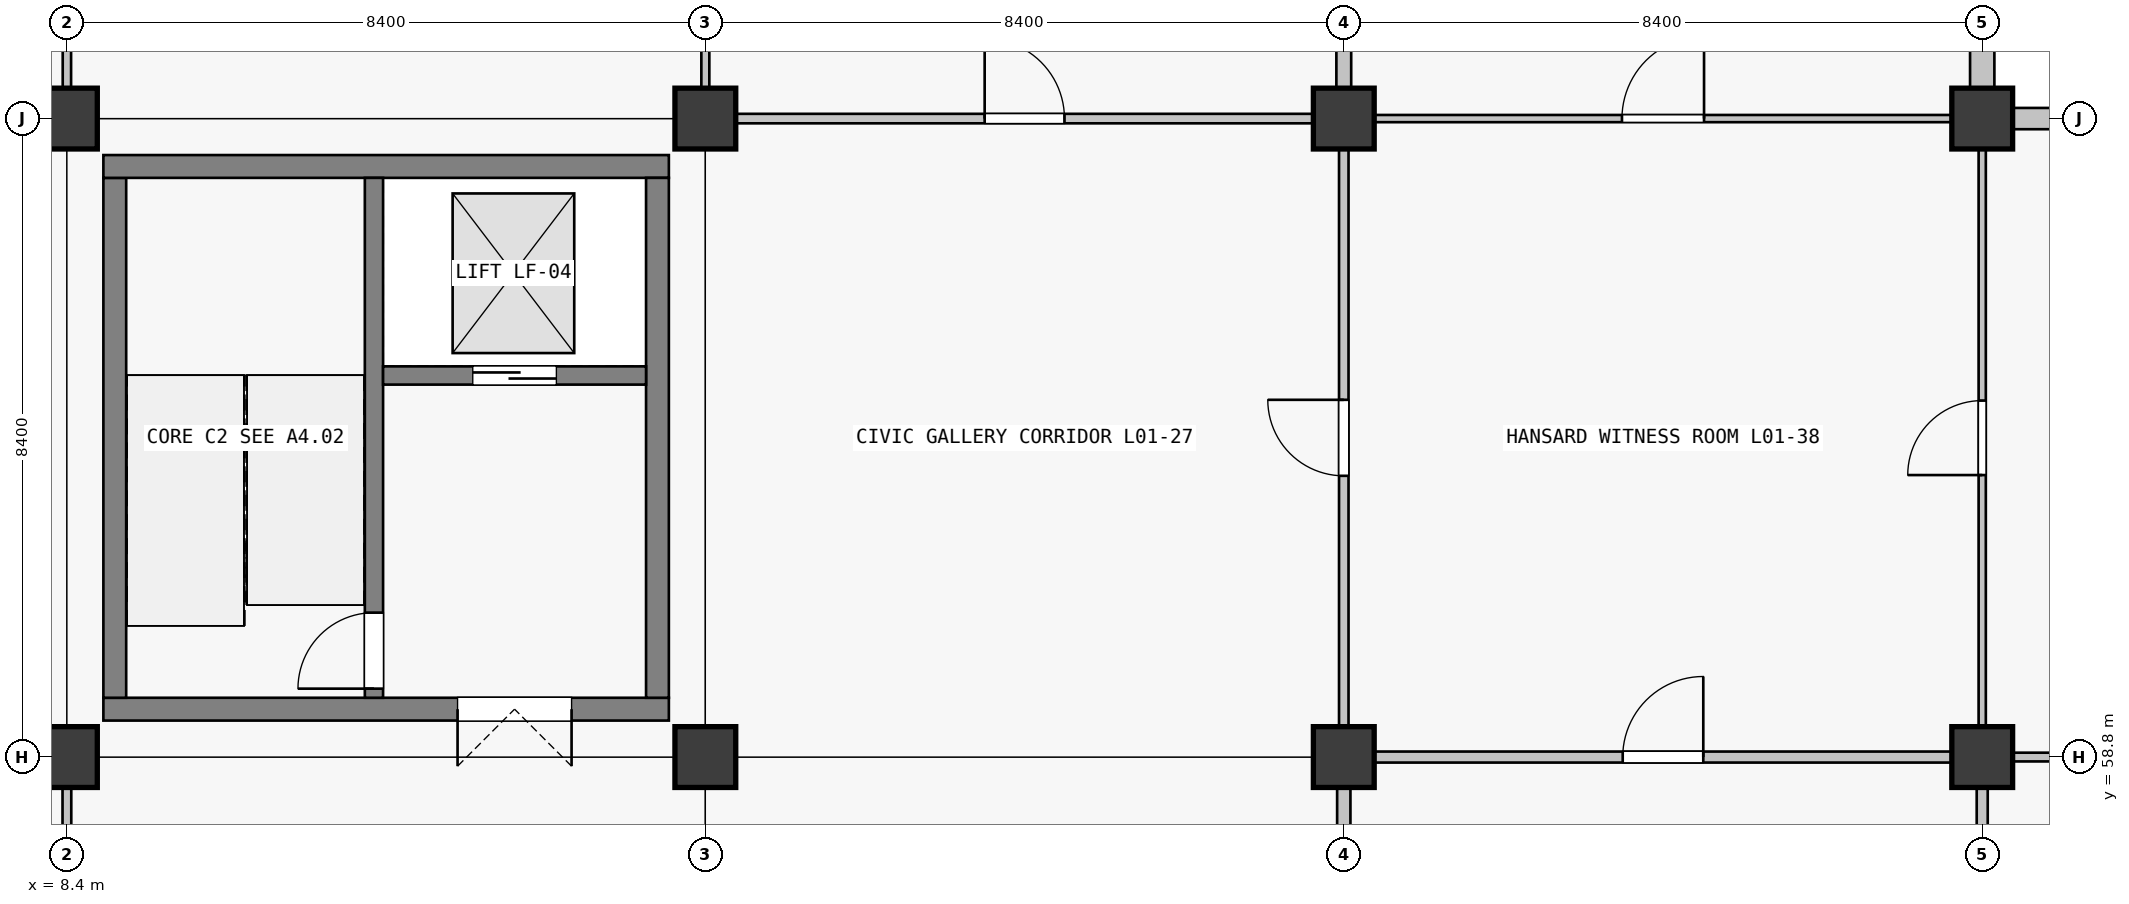
"""IFC4 building model, lengths in metres.
Left out: names, types, materials, properties, quantities, classifications, styles, units other than length and angle.
Written with IfcOpenShell. Run it as: python <this file> out.ifc"""

import sys

from ifc_helpers import new_model, si_unit, direction, frame, frame_2d, origin, origin_2d, place, context, subcontext, project, spatial, rectangle, extrude, element, fill, save


model = new_model("IFC4")
c1 = context("Model", 3, precision=1e-05, world=origin(), true_north=direction((0.0, 1.0)))
c2 = subcontext(c1, "Body", "Model", "MODEL_VIEW")
j1 = project(units=[si_unit("LENGTHUNIT", "METRE"), si_unit("PLANEANGLEUNIT", "RADIAN")], contexts=[c1])
p1 = place(None, origin())
s1 = spatial("IfcSite", under=j1, at=p1, CompositionType="ELEMENT")
p2 = place(p1, origin())
s2 = spatial("IfcBuilding", under=s1, at=p2, CompositionType="ELEMENT")
p3 = place(p2, frame((0.0, 0.0, 5.76)))
s3 = spatial("IfcBuildingStorey", under=s2, at=p3, CompositionType="ELEMENT", Elevation=5.76)
for number, where, z_axis, x_axis in (
    (1, (8.4, 58.8, 0.0), (0.0, 0.0, 1.0), (1.0, 0.0, 0.0)),
    (2, (8.4, 67.2, 0.0), (0.0, 0.0, 1.0), (1.0, 0.0, 0.0)),
    (3, (16.8, 58.8, 0.0), (0.0, 0.0, 1.0), (1.0, 0.0, 0.0)),
    (4, (16.8, 67.2, 0.0), (0.0, 0.0, 1.0), (1.0, 0.0, 0.0)),
    (5, (25.2, 58.8, 0.0), (0.0, 0.0, 1.0), (1.0, 0.0, 0.0)),
    (6, (25.2, 67.2, 0.0), (0.0, 0.0, 1.0), (1.0, 0.0, 0.0)),
    (7, (33.6, 58.8, 0.0), (0.0, 0.0, 1.0), (1.0, 0.0, 0.0)),
    (8, (33.6, 67.2, 0.0), (0.0, 0.0, 1.0), (1.0, 0.0, 0.0)),
):
    element("IfcColumn", number, at=place(p3, frame(where, z_axis=z_axis, x_axis=x_axis)), inside=s3, PredefinedType="COLUMN", context=c2, shape_type="SweptSolid", body=[
        extrude(rectangle(XDim=0.8, YDim=0.8, at=origin_2d()), origin(), (0.0, 0.0, 1.0), 4.5),
    ])
p4 = place(p3, frame((33.6, 75.199, 0.0), z_axis=(0.0, 0.0, 1.0), x_axis=(0.0, -1.0, 0.0)))
e9 = element("IfcWall", 9, at=p4, inside=s3, PredefinedType="SOLIDWALL", context=c2, shape_type="SweptSolid", body=[
    extrude(rectangle(XDim=7.598, YDim=0.32, at=frame_2d((3.799, 0.0))), origin(), (0.0, 0.0, 1.0), 3.4),
])
p5 = place(p4, frame((2.524, 0.0, 0.9)))
e10 = element("IfcOpeningElement", 10, at=p5, cuts=e9, PredefinedType="OPENING", context=c2, shape_type="SweptSolid", body=[
    extrude(rectangle(XDim=2.55, YDim=1.95, at=frame_2d((1.275, 0.975))), frame((0.0, 0.16, 0.0), z_axis=(0.0, -1.0, 0.0), x_axis=(1.0, 0.0, 0.0)), (0.0, 0.0, 1.0), 0.32),
])
p6 = place(p3, frame((34.001, 67.2, 0.0), z_axis=(0.0, 0.0, 1.0), x_axis=(1.0, 0.0, 0.0)))
e11 = element("IfcWall", 11, at=p6, inside=s3, PredefinedType="SOLIDWALL", context=c2, shape_type="SweptSolid", body=[
    extrude(rectangle(XDim=7.598, YDim=0.28, at=frame_2d((3.799, 0.0))), origin(), (0.0, 0.0, 1.0), 3.4),
])
p7 = place(p6, frame((3.149, 0.0, 0.9)))
e12 = element("IfcOpeningElement", 12, at=p7, cuts=e11, PredefinedType="OPENING", context=c2, shape_type="SweptSolid", body=[
    extrude(rectangle(XDim=1.3, YDim=1.95, at=frame_2d((0.65, 0.975))), frame((0.0, 0.14, 0.0), z_axis=(0.0, -1.0, 0.0), x_axis=(1.0, 0.0, 0.0)), (0.0, 0.0, 1.0), 0.28),
])
p8 = place(p3, frame((16.32, 59.43, 0.0), z_axis=(0.0, 0.0, 1.0), x_axis=(-1.0, 0.0, 0.0)))
e13 = element("IfcWall", 13, at=p8, inside=s3, PredefinedType="SHEAR", context=c2, shape_type="SweptSolid", body=[
    extrude(rectangle(XDim=7.44, YDim=0.3, at=frame_2d((3.72, 0.0))), origin(), (0.0, 0.0, 1.0), 4.5),
])
p9 = place(p8, frame((1.28, 0.0, 0.0)))
e14 = element("IfcOpeningElement", 14, at=p9, cuts=e13, PredefinedType="OPENING", context=c2, shape_type="SweptSolid", body=[
    extrude(rectangle(XDim=1.5, YDim=2.15, at=frame_2d((0.75, 1.075))), frame((0.0, 0.15, 0.0), z_axis=(0.0, -1.0, 0.0), x_axis=(1.0, 0.0, 0.0)), (0.0, 0.0, 1.0), 0.3),
])
p10 = place(p3, frame((9.03, 59.58, 0.0), z_axis=(0.0, 0.0, 1.0), x_axis=(0.0, 1.0, 0.0)))
e15 = element("IfcWall", 15, at=p10, inside=s3, PredefinedType="SHEAR", context=c2, shape_type="SweptSolid", body=[
    extrude(rectangle(XDim=6.84, YDim=0.3, at=frame_2d((3.42, 0.0))), origin(), (0.0, 0.0, 1.0), 4.5),
])
p11 = place(p3, frame((8.88, 66.57, 0.0), z_axis=(0.0, 0.0, 1.0), x_axis=(1.0, 0.0, 0.0)))
e16 = element("IfcWall", 16, at=p11, inside=s3, PredefinedType="SHEAR", context=c2, shape_type="SweptSolid", body=[
    extrude(rectangle(XDim=7.44, YDim=0.3, at=frame_2d((3.72, 0.0))), origin(), (0.0, 0.0, 1.0), 4.5),
])
p12 = place(p3, frame((16.17, 66.42, 0.0), z_axis=(0.0, 0.0, 1.0), x_axis=(0.0, -1.0, 0.0)))
e17 = element("IfcWall", 17, at=p12, inside=s3, PredefinedType="SHEAR", context=c2, shape_type="SweptSolid", body=[
    extrude(rectangle(XDim=6.84, YDim=0.3, at=frame_2d((3.42, 0.0))), origin(), (0.0, 0.0, 1.0), 4.5),
])
p13 = place(p3, frame((12.44, 59.58, 0.0), z_axis=(0.0, 0.0, 1.0), x_axis=(0.0, 1.0, 0.0)))
e18 = element("IfcWall", 18, at=p13, inside=s3, PredefinedType="SHEAR", context=c2, shape_type="SweptSolid", body=[
    extrude(rectangle(XDim=6.84, YDim=0.24, at=frame_2d((3.42, 0.0))), origin(), (0.0, 0.0, 1.0), 4.5),
])
p14 = place(p13, frame((0.12, 0.0, 0.0)))
e19 = element("IfcOpeningElement", 19, at=p14, cuts=e18, PredefinedType="OPENING", context=c2, shape_type="SweptSolid", body=[
    extrude(rectangle(XDim=1.0, YDim=2.15, at=frame_2d((0.5, 1.075))), frame((0.0, 0.12, 0.0), z_axis=(0.0, -1.0, 0.0), x_axis=(1.0, 0.0, 0.0)), (0.0, 0.0, 1.0), 0.24),
])
p15 = place(p3, frame((12.56, 63.82, 0.0), z_axis=(0.0, 0.0, 1.0), x_axis=(1.0, 0.0, 0.0)))
e20 = element("IfcWall", 20, at=p15, inside=s3, PredefinedType="SHEAR", context=c2, shape_type="SweptSolid", body=[
    extrude(rectangle(XDim=3.46, YDim=0.24, at=frame_2d((1.73, 0.0))), origin(), (0.0, 0.0, 1.0), 4.5),
])
p16 = place(p15, frame((1.18, 0.0, 0.0)))
e21 = element("IfcOpeningElement", 21, at=p16, cuts=e20, PredefinedType="OPENING", context=c2, shape_type="SweptSolid", body=[
    extrude(rectangle(XDim=1.1, YDim=2.15, at=frame_2d((0.55, 1.075))), frame((0.0, 0.12, 0.0), z_axis=(0.0, -1.0, 0.0), x_axis=(1.0, 0.0, 0.0)), (0.0, 0.0, 1.0), 0.24),
])
p17 = place(p3, frame((17.202, 67.2, 0.0), z_axis=(0.0, 0.0, 1.0), x_axis=(1.0, 0.0, 0.0)))
e22 = element("IfcWall", 22, at=p17, inside=s3, PredefinedType="PARTITIONING", context=c2, shape_type="SweptSolid", body=[
    extrude(rectangle(XDim=7.596, YDim=0.125, at=frame_2d((3.798, 0.0))), origin(), (0.0, 0.0, 1.0), 2.4),
])
p18 = place(p17, frame((3.273, 0.0, 0.0)))
e23 = element("IfcOpeningElement", 23, at=p18, cuts=e22, PredefinedType="OPENING", context=c2, shape_type="SweptSolid", body=[
    extrude(rectangle(XDim=1.05, YDim=2.12, at=frame_2d((0.525, 1.06))), frame((0.0, 0.062, 0.0), z_axis=(0.0, -1.0, 0.0), x_axis=(1.0, 0.0, 0.0)), (0.0, 0.0, 1.0), 0.125),
])
p19 = place(p3, frame((25.602, 58.8, 0.0), z_axis=(0.0, 0.0, 1.0), x_axis=(1.0, 0.0, 0.0)))
e24 = element("IfcWall", 24, at=p19, inside=s3, PredefinedType="PARTITIONING", context=c2, shape_type="SweptSolid", body=[
    extrude(rectangle(XDim=7.596, YDim=0.145, at=frame_2d((3.798, 0.0))), origin(), (0.0, 0.0, 1.0), 2.4),
])
p20 = place(p19, frame((3.268, 0.0, 0.0)))
e25 = element("IfcOpeningElement", 25, at=p20, cuts=e24, PredefinedType="OPENING", context=c2, shape_type="SweptSolid", body=[
    extrude(rectangle(XDim=1.06, YDim=2.22, at=frame_2d((0.53, 1.11))), frame((0.0, 0.073, 0.0), z_axis=(0.0, -1.0, 0.0), x_axis=(1.0, 0.0, 0.0)), (0.0, 0.0, 1.0), 0.145),
])
p21 = place(p3, frame((25.602, 67.2, 0.0), z_axis=(0.0, 0.0, 1.0), x_axis=(1.0, 0.0, 0.0)))
e26 = element("IfcWall", 26, at=p21, inside=s3, PredefinedType="PARTITIONING", context=c2, shape_type="SweptSolid", body=[
    extrude(rectangle(XDim=7.596, YDim=0.095, at=frame_2d((3.798, 0.0))), origin(), (0.0, 0.0, 1.0), 2.4),
])
p22 = place(p21, frame((3.258, 0.0, 0.0)))
e27 = element("IfcOpeningElement", 27, at=p22, cuts=e26, PredefinedType="OPENING", context=c2, shape_type="SweptSolid", body=[
    extrude(rectangle(XDim=1.08, YDim=2.22, at=frame_2d((0.54, 1.11))), frame((0.0, 0.047, 0.0), z_axis=(0.0, -1.0, 0.0), x_axis=(1.0, 0.0, 0.0)), (0.0, 0.0, 1.0), 0.095),
])
p23 = place(p3, frame((34.002, 58.8, 0.0), z_axis=(0.0, 0.0, 1.0), x_axis=(1.0, 0.0, 0.0)))
e28 = element("IfcWall", 28, at=p23, inside=s3, PredefinedType="PARTITIONING", context=c2, shape_type="SweptSolid", body=[
    extrude(rectangle(XDim=7.621, YDim=0.115, at=frame_2d((3.811, 0.0))), origin(), (0.0, 0.0, 1.0), 2.4),
])
p24 = place(p23, frame((3.28, 0.0, 0.0)))
e29 = element("IfcOpeningElement", 29, at=p24, cuts=e28, PredefinedType="OPENING", context=c2, shape_type="SweptSolid", body=[
    extrude(rectangle(XDim=1.06, YDim=2.22, at=frame_2d((0.53, 1.11))), frame((0.0, 0.058, 0.0), z_axis=(0.0, -1.0, 0.0), x_axis=(1.0, 0.0, 0.0)), (0.0, 0.0, 1.0), 0.115),
])
p25 = place(p3, frame((8.4, 50.802, 0.0), z_axis=(0.0, 0.0, 1.0), x_axis=(0.0, 1.0, 0.0)))
e30 = element("IfcWall", 30, at=p25, inside=s3, PredefinedType="PARTITIONING", context=c2, shape_type="SweptSolid", body=[
    extrude(rectangle(XDim=7.596, YDim=0.115, at=frame_2d((3.798, 0.0))), origin(), (0.0, 0.0, 1.0), 2.4),
])
p26 = place(p25, frame((3.333, 0.0, 0.0)))
e31 = element("IfcOpeningElement", 31, at=p26, cuts=e30, PredefinedType="OPENING", context=c2, shape_type="SweptSolid", body=[
    extrude(rectangle(XDim=0.93, YDim=2.12, at=frame_2d((0.465, 1.06))), frame((0.0, 0.058, 0.0), z_axis=(0.0, -1.0, 0.0), x_axis=(1.0, 0.0, 0.0)), (0.0, 0.0, 1.0), 0.115),
])
p27 = place(p3, frame((8.4, 67.602, 0.0), z_axis=(0.0, 0.0, 1.0), x_axis=(0.0, 1.0, 0.0)))
e32 = element("IfcWall", 32, at=p27, inside=s3, PredefinedType="MOVABLE", context=c2, shape_type="SweptSolid", body=[
    extrude(rectangle(XDim=7.596, YDim=0.11, at=frame_2d((3.798, 0.0))), origin(), (0.0, 0.0, 1.0), 2.4),
])
p28 = place(p27, frame((3.318, 0.0, 0.0)))
e33 = element("IfcOpeningElement", 33, at=p28, cuts=e32, PredefinedType="OPENING", context=c2, shape_type="SweptSolid", body=[
    extrude(rectangle(XDim=0.96, YDim=2.18, at=frame_2d((0.48, 1.09))), frame((0.0, 0.055, 0.0), z_axis=(0.0, -1.0, 0.0), x_axis=(1.0, 0.0, 0.0)), (0.0, 0.0, 1.0), 0.11),
])
p29 = place(p3, frame((16.8, 67.602, 0.0), z_axis=(0.0, 0.0, 1.0), x_axis=(0.0, 1.0, 0.0)))
e34 = element("IfcWall", 34, at=p29, inside=s3, PredefinedType="PARTITIONING", context=c2, shape_type="SweptSolid", body=[
    extrude(rectangle(XDim=7.596, YDim=0.105, at=frame_2d((3.798, 0.0))), origin(), (0.0, 0.0, 1.0), 2.4),
])
p30 = place(p29, frame((3.313, 0.0, 0.0)))
e35 = element("IfcOpeningElement", 35, at=p30, cuts=e34, PredefinedType="OPENING", context=c2, shape_type="SweptSolid", body=[
    extrude(rectangle(XDim=0.97, YDim=2.12, at=frame_2d((0.485, 1.06))), frame((0.0, 0.052, 0.0), z_axis=(0.0, -1.0, 0.0), x_axis=(1.0, 0.0, 0.0)), (0.0, 0.0, 1.0), 0.105),
])
p31 = place(p3, frame((25.2, 50.802, 0.0), z_axis=(0.0, 0.0, 1.0), x_axis=(0.0, 1.0, 0.0)))
e36 = element("IfcWall", 36, at=p31, inside=s3, PredefinedType="PARTITIONING", context=c2, shape_type="SweptSolid", body=[
    extrude(rectangle(XDim=7.596, YDim=0.175, at=frame_2d((3.798, 0.0))), origin(), (0.0, 0.0, 1.0), 2.4),
])
p32 = place(p31, frame((3.288, 0.0, 0.0)))
e37 = element("IfcOpeningElement", 37, at=p32, cuts=e36, PredefinedType="OPENING", context=c2, shape_type="SweptSolid", body=[
    extrude(rectangle(XDim=1.02, YDim=2.2, at=frame_2d((0.51, 1.1))), frame((0.0, 0.087, 0.0), z_axis=(0.0, -1.0, 0.0), x_axis=(1.0, 0.0, 0.0)), (0.0, 0.0, 1.0), 0.175),
])
p33 = place(p3, frame((25.2, 59.202, 0.0), z_axis=(0.0, 0.0, 1.0), x_axis=(0.0, 1.0, 0.0)))
e38 = element("IfcWall", 38, at=p33, inside=s3, PredefinedType="PARTITIONING", context=c2, shape_type="SweptSolid", body=[
    extrude(rectangle(XDim=7.596, YDim=0.125, at=frame_2d((3.798, 0.0))), origin(), (0.0, 0.0, 1.0), 2.4),
])
p34 = place(p33, frame((3.298, 0.0, 0.0)))
e39 = element("IfcOpeningElement", 39, at=p34, cuts=e38, PredefinedType="OPENING", context=c2, shape_type="SweptSolid", body=[
    extrude(rectangle(XDim=1.0, YDim=2.2, at=frame_2d((0.5, 1.1))), frame((0.0, 0.062, 0.0), z_axis=(0.0, -1.0, 0.0), x_axis=(1.0, 0.0, 0.0)), (0.0, 0.0, 1.0), 0.125),
])
p35 = place(p3, frame((25.2, 67.602, 0.0), z_axis=(0.0, 0.0, 1.0), x_axis=(0.0, 1.0, 0.0)))
e40 = element("IfcWall", 40, at=p35, inside=s3, PredefinedType="PARTITIONING", context=c2, shape_type="SweptSolid", body=[
    extrude(rectangle(XDim=7.596, YDim=0.195, at=frame_2d((3.798, 0.0))), origin(), (0.0, 0.0, 1.0), 2.4),
])
p36 = place(p35, frame((3.288, 0.0, 0.0)))
e41 = element("IfcOpeningElement", 41, at=p36, cuts=e40, PredefinedType="OPENING", context=c2, shape_type="SweptSolid", body=[
    extrude(rectangle(XDim=1.02, YDim=2.2, at=frame_2d((0.51, 1.1))), frame((0.0, 0.098, 0.0), z_axis=(0.0, -1.0, 0.0), x_axis=(1.0, 0.0, 0.0)), (0.0, 0.0, 1.0), 0.195),
])
p37 = place(p3, frame((33.6, 50.802, 0.0), z_axis=(0.0, 0.0, 1.0), x_axis=(0.0, 1.0, 0.0)))
e42 = element("IfcWall", 42, at=p37, inside=s3, PredefinedType="PARTITIONING", context=c2, shape_type="SweptSolid", body=[
    extrude(rectangle(XDim=7.596, YDim=0.145, at=frame_2d((3.798, 0.0))), origin(), (0.0, 0.0, 1.0), 2.4),
])
p38 = place(p37, frame((3.318, 0.0, 0.0)))
e43 = element("IfcOpeningElement", 43, at=p38, cuts=e42, PredefinedType="OPENING", context=c2, shape_type="SweptSolid", body=[
    extrude(rectangle(XDim=0.96, YDim=2.18, at=frame_2d((0.48, 1.09))), frame((0.0, 0.073, 0.0), z_axis=(0.0, -1.0, 0.0), x_axis=(1.0, 0.0, 0.0)), (0.0, 0.0, 1.0), 0.145),
])
p39 = place(p3, frame((33.6, 59.202, 0.0), z_axis=(0.0, 0.0, 1.0), x_axis=(0.0, 1.0, 0.0)))
e44 = element("IfcWall", 44, at=p39, inside=s3, PredefinedType="PARTITIONING", context=c2, shape_type="SweptSolid", body=[
    extrude(rectangle(XDim=7.596, YDim=0.095, at=frame_2d((3.798, 0.0))), origin(), (0.0, 0.0, 1.0), 2.4),
])
p40 = place(p39, frame((3.308, 0.0, 0.0)))
e45 = element("IfcOpeningElement", 45, at=p40, cuts=e44, PredefinedType="OPENING", context=c2, shape_type="SweptSolid", body=[
    extrude(rectangle(XDim=0.98, YDim=2.18, at=frame_2d((0.49, 1.09))), frame((0.0, 0.047, 0.0), z_axis=(0.0, -1.0, 0.0), x_axis=(1.0, 0.0, 0.0)), (0.0, 0.0, 1.0), 0.095),
])
p41 = place(p14, origin())
e46 = element("IfcDoor", 46, at=p41, inside=s3, OperationType="SINGLE_SWING_LEFT", PredefinedType="DOOR", context=c2, shape_type="SweptSolid", body=[
    extrude(rectangle(XDim=1.0, YDim=2.15, at=frame_2d((0.5, 1.075))), frame((0.0, 0.025, 0.0), z_axis=(0.0, -1.0, 0.0), x_axis=(1.0, 0.0, 0.0)), (0.0, 0.0, 1.0), 0.05),
])
fill(e19, e46)
p42 = place(p9, origin())
e47 = element("IfcDoor", 47, at=p42, inside=s3, OperationType="DOUBLE_DOOR_SINGLE_SWING", PredefinedType="DOOR", context=c2, shape_type="SweptSolid", body=[
    extrude(rectangle(XDim=1.5, YDim=2.15, at=frame_2d((0.75, 1.075))), frame((0.0, 0.025, 0.0), z_axis=(0.0, -1.0, 0.0), x_axis=(1.0, 0.0, 0.0)), (0.0, 0.0, 1.0), 0.05),
])
fill(e14, e47)
p43 = place(p16, origin())
e48 = element("IfcDoor", 48, at=p43, inside=s3, OperationType="DOUBLE_DOOR_SLIDING", PredefinedType="DOOR", context=c2, shape_type="SweptSolid", body=[
    extrude(rectangle(XDim=1.1, YDim=2.15, at=frame_2d((0.55, 1.075))), frame((0.0, 0.025, 0.0), z_axis=(0.0, -1.0, 0.0), x_axis=(1.0, 0.0, 0.0)), (0.0, 0.0, 1.0), 0.05),
])
fill(e21, e48)
p44 = place(p18, origin())
e49 = element("IfcDoor", 49, at=p44, inside=s3, OperationType="SINGLE_SWING_LEFT", PredefinedType="DOOR", context=c2, shape_type="SweptSolid", body=[
    extrude(rectangle(XDim=1.05, YDim=2.12, at=frame_2d((0.525, 1.06))), frame((0.0, 0.025, 0.0), z_axis=(0.0, -1.0, 0.0), x_axis=(1.0, 0.0, 0.0)), (0.0, 0.0, 1.0), 0.05),
])
fill(e23, e49)
p45 = place(p34, origin())
e50 = element("IfcDoor", 50, at=p45, inside=s3, OperationType="SINGLE_SWING_RIGHT", PredefinedType="DOOR", context=c2, shape_type="SweptSolid", body=[
    extrude(rectangle(XDim=1.0, YDim=2.2, at=frame_2d((0.5, 1.1))), frame((0.0, 0.025, 0.0), z_axis=(0.0, -1.0, 0.0), x_axis=(1.0, 0.0, 0.0)), (0.0, 0.0, 1.0), 0.05),
])
fill(e39, e50)
p46 = place(p22, origin())
e51 = element("IfcDoor", 51, at=p46, inside=s3, OperationType="SINGLE_SWING_RIGHT", PredefinedType="DOOR", context=c2, shape_type="SweptSolid", body=[
    extrude(rectangle(XDim=1.08, YDim=2.22, at=frame_2d((0.54, 1.11))), frame((0.0, 0.025, 0.0), z_axis=(0.0, -1.0, 0.0), x_axis=(1.0, 0.0, 0.0)), (0.0, 0.0, 1.0), 0.05),
])
fill(e27, e51)
p47 = place(p20, origin())
e52 = element("IfcDoor", 52, at=p47, inside=s3, OperationType="SINGLE_SWING_RIGHT", PredefinedType="DOOR", context=c2, shape_type="SweptSolid", body=[
    extrude(rectangle(XDim=1.06, YDim=2.22, at=frame_2d((0.53, 1.11))), frame((0.0, 0.025, 0.0), z_axis=(0.0, -1.0, 0.0), x_axis=(1.0, 0.0, 0.0)), (0.0, 0.0, 1.0), 0.05),
])
fill(e25, e52)
p48 = place(p40, origin())
e53 = element("IfcDoor", 53, at=p48, inside=s3, OperationType="SINGLE_SWING_LEFT", PredefinedType="DOOR", context=c2, shape_type="SweptSolid", body=[
    extrude(rectangle(XDim=0.98, YDim=2.18, at=frame_2d((0.49, 1.09))), frame((0.0, 0.025, 0.0), z_axis=(0.0, -1.0, 0.0), x_axis=(1.0, 0.0, 0.0)), (0.0, 0.0, 1.0), 0.05),
])
fill(e45, e53)
save(model, sys.argv[1])
